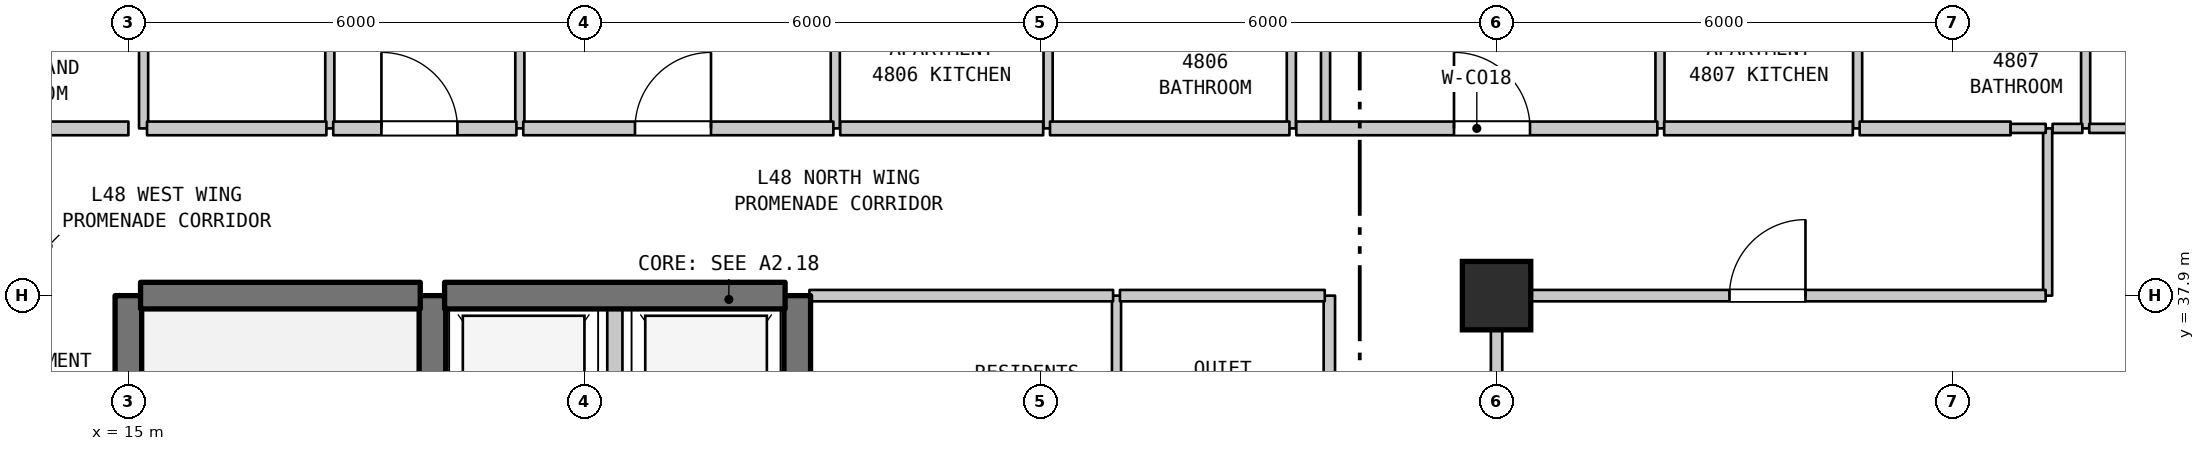
"""IFC4 building model, lengths in metres.
Left out: names, types, materials, properties, quantities, classifications, styles, units other than length and angle.
Written with IfcOpenShell. Run it as: python <this file> out.ifc"""

import sys

from ifc_helpers import new_model, si_unit, direction, frame, frame_2d, origin, origin_2d, place, context, subcontext, project, spatial, rectangle, extrude, element, fill, save


model = new_model("IFC4")
c1 = context("Model", 3, precision=1e-05, world=origin(), true_north=direction((0.0, 1.0)))
c2 = subcontext(c1, "Body", "Model", "MODEL_VIEW")
j1 = project(units=[si_unit("LENGTHUNIT", "METRE"), si_unit("PLANEANGLEUNIT", "RADIAN")], contexts=[c1])
p1 = place(None, origin())
s1 = spatial("IfcSite", under=j1, at=p1, CompositionType="ELEMENT")
p2 = place(p1, origin())
s2 = spatial("IfcBuilding", under=s1, at=p2, CompositionType="ELEMENT")
p3 = place(p2, frame((0.0, 0.0, 195.8)))
s3 = spatial("IfcBuildingStorey", under=s2, at=p3, CompositionType="ELEMENT", Elevation=195.8)
p4 = place(p3, frame((33.0, 37.9, 0.0), z_axis=(0.0, 0.0, 1.0), x_axis=(1.0, 0.0, 0.0)))
e1 = element("IfcColumn", 1, at=p4, inside=s3, PredefinedType="COLUMN", context=c2, shape_type="SweptSolid", body=[
    extrude(rectangle(XDim=0.9, YDim=0.9, at=origin_2d()), origin(), (0.0, 0.0, 1.0), 3.7),
])
p5 = place(p3, frame((15.0, 31.1, 0.0), z_axis=(0.0, 0.0, 1.0), x_axis=(0.0, 1.0, 0.0)))
e2 = element("IfcWall", 2, at=p5, inside=s3, PredefinedType="SHEAR", context=c2, shape_type="SweptSolid", body=[
    extrude(rectangle(XDim=6.8, YDim=0.35, at=frame_2d((3.4, 0.0))), origin(), (0.0, 0.0, 1.0), 3.39),
])
p6 = place(p3, frame((15.2, 40.1, 0.0), z_axis=(0.0, 0.0, 1.0), x_axis=(0.0, 1.0, 0.0)))
e3 = element("IfcWall", 3, at=p6, inside=s3, PredefinedType="PARTITIONING", context=c2, shape_type="SweptSolid", body=[
    extrude(rectangle(XDim=3.2, YDim=0.12, at=frame_2d((1.6, 0.0))), origin(), (0.0, 0.0, 1.0), 3.39),
])
p7 = place(p3, frame((17.65, 40.1, 0.0), z_axis=(0.0, 0.0, 1.0), x_axis=(0.0, 1.0, 0.0)))
e4 = element("IfcWall", 4, at=p7, inside=s3, PredefinedType="PARTITIONING", context=c2, shape_type="SweptSolid", body=[
    extrude(rectangle(XDim=3.2, YDim=0.12, at=frame_2d((1.6, 0.0))), origin(), (0.0, 0.0, 1.0), 3.39),
])
p8 = place(p7, frame((1.15, 0.0, 0.0)))
e5 = element("IfcOpeningElement", 5, at=p8, cuts=e4, PredefinedType="OPENING", context=c2, shape_type="SweptSolid", body=[
    extrude(rectangle(XDim=0.9, YDim=2.15, at=frame_2d((0.45, 1.075))), frame((0.0, 0.07, 0.0), z_axis=(0.0, -1.0, 0.0), x_axis=(1.0, 0.0, 0.0)), (0.0, 0.0, 1.0), 0.14),
])
p9 = place(p3, frame((19.0, 35.0, 0.0), z_axis=(0.0, 0.0, 1.0), x_axis=(0.0, 1.0, 0.0)))
e6 = element("IfcWall", 6, at=p9, inside=s3, PredefinedType="SHEAR", context=c2, shape_type="SweptSolid", body=[
    extrude(rectangle(XDim=2.9, YDim=0.35, at=frame_2d((1.45, 0.0))), origin(), (0.0, 0.0, 1.0), 3.39),
])
p10 = place(p3, frame((20.15, 40.1, 0.0), z_axis=(0.0, 0.0, 1.0), x_axis=(0.0, 1.0, 0.0)))
e7 = element("IfcWall", 7, at=p10, inside=s3, PredefinedType="PARTITIONING", context=c2, shape_type="SweptSolid", body=[
    extrude(rectangle(XDim=13.79, YDim=0.12, at=frame_2d((6.895, 0.0))), origin(), (0.0, 0.0, 1.0), 3.39),
])
p11 = place(p3, frame((21.4, 35.0, 0.0), z_axis=(0.0, 0.0, 1.0), x_axis=(0.0, 1.0, 0.0)))
e8 = element("IfcWall", 8, at=p11, inside=s3, PredefinedType="STANDARD", context=c2, shape_type="SweptSolid", body=[
    extrude(rectangle(XDim=2.9, YDim=0.2, at=frame_2d((1.45, 0.0))), origin(), (0.0, 0.0, 1.0), 3.39),
])
p12 = place(p3, frame((23.8, 35.0, 0.0), z_axis=(0.0, 0.0, 1.0), x_axis=(0.0, 1.0, 0.0)))
e9 = element("IfcWall", 9, at=p12, inside=s3, PredefinedType="SHEAR", context=c2, shape_type="SweptSolid", body=[
    extrude(rectangle(XDim=2.9, YDim=0.35, at=frame_2d((1.45, 0.0))), origin(), (0.0, 0.0, 1.0), 3.39),
])
for number, where, z_axis, x_axis in (
    (10, (24.3, 40.1, 0.0), (0.0, 0.0, 1.0), (0.0, 1.0, 0.0)),
    (11, (27.1, 40.1, 0.0), (0.0, 0.0, 1.0), (0.0, 1.0, 0.0)),
):
    element("IfcWall", number, at=place(p3, frame(where, z_axis=z_axis, x_axis=x_axis)), inside=s3, PredefinedType="PARTITIONING", context=c2, shape_type="SweptSolid", body=[
        extrude(rectangle(XDim=2.3, YDim=0.12, at=frame_2d((1.15, 0.0))), origin(), (0.0, 0.0, 1.0), 3.39),
    ])
p13 = place(p3, frame((28.0, 35.0, 0.0), z_axis=(0.0, 0.0, 1.0), x_axis=(0.0, 1.0, 0.0)))
e12 = element("IfcWall", 12, at=p13, inside=s3, PredefinedType="PARTITIONING", context=c2, shape_type="SweptSolid", body=[
    extrude(rectangle(XDim=2.9, YDim=0.12, at=frame_2d((1.45, 0.0))), origin(), (0.0, 0.0, 1.0), 3.39),
])
p14 = place(p3, frame((30.3, 40.1, 0.0), z_axis=(0.0, 0.0, 1.0), x_axis=(0.0, 1.0, 0.0)))
e13 = element("IfcWall", 13, at=p14, inside=s3, PredefinedType="PARTITIONING", context=c2, shape_type="SweptSolid", body=[
    extrude(rectangle(XDim=2.3, YDim=0.12, at=frame_2d((1.15, 0.0))), origin(), (0.0, 0.0, 1.0), 3.39),
])
p15 = place(p3, frame((30.75, 40.1, 0.0), z_axis=(0.0, 0.0, 1.0), x_axis=(0.0, 1.0, 0.0)))
e14 = element("IfcWall", 14, at=p15, inside=s3, PredefinedType="PARTITIONING", context=c2, shape_type="SweptSolid", body=[
    extrude(rectangle(XDim=13.79, YDim=0.12, at=frame_2d((6.895, 0.0))), origin(), (0.0, 0.0, 1.0), 3.39),
])
p16 = place(p3, frame((30.8, 35.0, 0.0), z_axis=(0.0, 0.0, 1.0), x_axis=(0.0, 1.0, 0.0)))
e15 = element("IfcWall", 15, at=p16, inside=s3, PredefinedType="STANDARD", context=c2, shape_type="SweptSolid", body=[
    extrude(rectangle(XDim=2.9, YDim=0.15, at=frame_2d((1.45, 0.0))), origin(), (0.0, 0.0, 1.0), 3.39),
])
p17 = place(p3, frame((33.0, 34.22, 0.0), z_axis=(0.0, 0.0, 1.0), x_axis=(0.0, 1.0, 0.0)))
e16 = element("IfcWall", 16, at=p17, inside=s3, PredefinedType="STANDARD", context=c2, shape_type="SweptSolid", body=[
    extrude(rectangle(XDim=3.68, YDim=0.15, at=frame_2d((1.84, 0.0))), origin(), (0.0, 0.0, 1.0), 2.89),
])
p18 = place(p17, frame((1.268, 0.0, 0.0)))
e17 = element("IfcOpeningElement", 17, at=p18, cuts=e16, PredefinedType="OPENING", context=c2, shape_type="SweptSolid", body=[
    extrude(rectangle(XDim=1.0, YDim=2.15, at=frame_2d((0.5, 1.075))), frame((0.0, 0.085, 0.0), z_axis=(0.0, -1.0, 0.0), x_axis=(1.0, 0.0, 0.0)), (0.0, 0.0, 1.0), 0.17),
])
for number, where, z_axis, x_axis in (
    (18, (35.15, 40.1, 0.0), (0.0, 0.0, 1.0), (0.0, 1.0, 0.0)),
    (19, (37.75, 40.1, 0.0), (0.0, 0.0, 1.0), (0.0, 1.0, 0.0)),
):
    element("IfcWall", number, at=place(p3, frame(where, z_axis=z_axis, x_axis=x_axis)), inside=s3, PredefinedType="PARTITIONING", context=c2, shape_type="SweptSolid", body=[
        extrude(rectangle(XDim=2.3, YDim=0.12, at=frame_2d((1.15, 0.0))), origin(), (0.0, 0.0, 1.0), 3.39),
    ])
p19 = place(p3, frame((40.25, 37.9, 0.0), z_axis=(0.0, 0.0, 1.0), x_axis=(0.0, 1.0, 0.0)))
e20 = element("IfcWall", 20, at=p19, inside=s3, PredefinedType="PARTITIONING", context=c2, shape_type="SweptSolid", body=[
    extrude(rectangle(XDim=2.2, YDim=0.12, at=frame_2d((1.1, 0.0))), origin(), (0.0, 0.0, 1.0), 3.39),
])
p20 = place(p3, frame((40.75, 40.1, 0.0), z_axis=(0.0, 0.0, 1.0), x_axis=(0.0, 1.0, 0.0)))
e21 = element("IfcWall", 21, at=p20, inside=s3, PredefinedType="PARTITIONING", context=c2, shape_type="SweptSolid", body=[
    extrude(rectangle(XDim=2.3, YDim=0.12, at=frame_2d((1.15, 0.0))), origin(), (0.0, 0.0, 1.0), 3.39),
])
p21 = place(p3, frame((15.16, 37.9, 0.0), z_axis=(0.0, 0.0, 1.0), x_axis=(1.0, 0.0, 0.0)))
e22 = element("IfcWall", 22, at=p21, inside=s3, PredefinedType="SHEAR", context=c2, shape_type="SweptSolid", body=[
    extrude(rectangle(XDim=3.68, YDim=0.35, at=frame_2d((1.84, 0.0))), origin(), (0.0, 0.0, 1.0), 3.39),
])
p22 = place(p3, frame((19.16, 37.9, 0.0), z_axis=(0.0, 0.0, 1.0), x_axis=(1.0, 0.0, 0.0)))
e23 = element("IfcWall", 23, at=p22, inside=s3, PredefinedType="SHEAR", context=c2, shape_type="SweptSolid", body=[
    extrude(rectangle(XDim=4.48, YDim=0.35, at=frame_2d((2.24, 0.0))), origin(), (0.0, 0.0, 1.0), 3.39),
])
p23 = place(p3, frame((23.96, 37.9, 0.0), z_axis=(0.0, 0.0, 1.0), x_axis=(1.0, 0.0, 0.0)))
e24 = element("IfcWall", 24, at=p23, inside=s3, PredefinedType="STANDARD", context=c2, shape_type="SweptSolid", body=[
    extrude(rectangle(XDim=3.995, YDim=0.15, at=frame_2d((1.998, 0.0))), origin(), (0.0, 0.0, 1.0), 2.89),
])
p24 = place(p3, frame((28.045, 37.9, 0.0), z_axis=(0.0, 0.0, 1.0), x_axis=(1.0, 0.0, 0.0)))
e25 = element("IfcWall", 25, at=p24, inside=s3, PredefinedType="STANDARD", context=c2, shape_type="SweptSolid", body=[
    extrude(rectangle(XDim=2.695, YDim=0.15, at=frame_2d((1.348, 0.0))), origin(), (0.0, 0.0, 1.0), 2.89),
])
p25 = place(p3, frame((33.06, 37.9, 0.0), z_axis=(0.0, 0.0, 1.0), x_axis=(1.0, 0.0, 0.0)))
e26 = element("IfcWall", 26, at=p25, inside=s3, PredefinedType="STANDARD", context=c2, shape_type="SweptSolid", body=[
    extrude(rectangle(XDim=7.164, YDim=0.15, at=frame_2d((3.582, 0.0))), origin(), (0.0, 0.0, 1.0), 3.39),
])
p26 = place(p25, frame((3.004, 0.0, 0.0)))
e27 = element("IfcOpeningElement", 27, at=p26, cuts=e26, PredefinedType="OPENING", context=c2, shape_type="SweptSolid", body=[
    extrude(rectangle(XDim=1.0, YDim=2.15, at=frame_2d((0.5, 1.075))), frame((0.0, 0.085, 0.0), z_axis=(0.0, -1.0, 0.0), x_axis=(1.0, 0.0, 0.0)), (0.0, 0.0, 1.0), 0.17),
])
p27 = place(p3, frame((12.875, 40.1, 0.0), z_axis=(0.0, 0.0, 1.0), x_axis=(1.0, 0.0, 0.0)))
e28 = element("IfcWall", 28, at=p27, inside=s3, PredefinedType="STANDARD", context=c2, shape_type="SweptSolid", body=[
    extrude(rectangle(XDim=2.125, YDim=0.18, at=frame_2d((1.062, 0.0))), origin(), (0.0, 0.0, 1.0), 3.39),
])
p28 = place(p3, frame((15.245, 40.1, 0.0), z_axis=(0.0, 0.0, 1.0), x_axis=(1.0, 0.0, 0.0)))
e29 = element("IfcWall", 29, at=p28, inside=s3, PredefinedType="STANDARD", context=c2, shape_type="SweptSolid", body=[
    extrude(rectangle(XDim=2.36, YDim=0.18, at=frame_2d((1.18, 0.0))), origin(), (0.0, 0.0, 1.0), 3.39),
])
p29 = place(p3, frame((17.695, 40.1, 0.0), z_axis=(0.0, 0.0, 1.0), x_axis=(1.0, 0.0, 0.0)))
e30 = element("IfcWall", 30, at=p29, inside=s3, PredefinedType="STANDARD", context=c2, shape_type="SweptSolid", body=[
    extrude(rectangle(XDim=2.41, YDim=0.18, at=frame_2d((1.205, 0.0))), origin(), (0.0, 0.0, 1.0), 3.39),
])
p30 = place(p29, frame((0.634, 0.0, 0.0)))
e31 = element("IfcOpeningElement", 31, at=p30, cuts=e30, PredefinedType="OPENING", context=c2, shape_type="SweptSolid", body=[
    extrude(rectangle(XDim=1.0, YDim=2.15, at=frame_2d((0.5, 1.075))), frame((0.0, 0.1, 0.0), z_axis=(0.0, -1.0, 0.0), x_axis=(1.0, 0.0, 0.0)), (0.0, 0.0, 1.0), 0.2),
])
p31 = place(p3, frame((20.195, 40.1, 0.0), z_axis=(0.0, 0.0, 1.0), x_axis=(1.0, 0.0, 0.0)))
e32 = element("IfcWall", 32, at=p31, inside=s3, PredefinedType="STANDARD", context=c2, shape_type="SweptSolid", body=[
    extrude(rectangle(XDim=4.08, YDim=0.18, at=frame_2d((2.04, 0.0))), origin(), (0.0, 0.0, 1.0), 3.39),
])
p32 = place(p31, frame((1.47, 0.0, 0.0)))
e33 = element("IfcOpeningElement", 33, at=p32, cuts=e32, PredefinedType="OPENING", context=c2, shape_type="SweptSolid", body=[
    extrude(rectangle(XDim=1.0, YDim=2.15, at=frame_2d((0.5, 1.075))), frame((0.0, 0.1, 0.0), z_axis=(0.0, -1.0, 0.0), x_axis=(1.0, 0.0, 0.0)), (0.0, 0.0, 1.0), 0.2),
])
p33 = place(p3, frame((24.365, 40.1, 0.0), z_axis=(0.0, 0.0, 1.0), x_axis=(1.0, 0.0, 0.0)))
e34 = element("IfcWall", 34, at=p33, inside=s3, PredefinedType="STANDARD", context=c2, shape_type="SweptSolid", body=[
    extrude(rectangle(XDim=2.67, YDim=0.18, at=frame_2d((1.335, 0.0))), origin(), (0.0, 0.0, 1.0), 3.39),
])
p34 = place(p3, frame((27.125, 40.1, 0.0), z_axis=(0.0, 0.0, 1.0), x_axis=(1.0, 0.0, 0.0)))
e35 = element("IfcWall", 35, at=p34, inside=s3, PredefinedType="STANDARD", context=c2, shape_type="SweptSolid", body=[
    extrude(rectangle(XDim=3.15, YDim=0.18, at=frame_2d((1.575, 0.0))), origin(), (0.0, 0.0, 1.0), 3.39),
])
p35 = place(p3, frame((30.365, 40.1, 0.0), z_axis=(0.0, 0.0, 1.0), x_axis=(1.0, 0.0, 0.0)))
e36 = element("IfcWall", 36, at=p35, inside=s3, PredefinedType="STANDARD", context=c2, shape_type="SweptSolid", body=[
    extrude(rectangle(XDim=4.75, YDim=0.18, at=frame_2d((2.375, 0.0))), origin(), (0.0, 0.0, 1.0), 3.39),
])
p36 = place(p35, frame((2.075, 0.0, 0.0)))
e37 = element("IfcOpeningElement", 37, at=p36, cuts=e36, PredefinedType="OPENING", context=c2, shape_type="SweptSolid", body=[
    extrude(rectangle(XDim=1.0, YDim=2.15, at=frame_2d((0.5, 1.075))), frame((0.0, 0.1, 0.0), z_axis=(0.0, -1.0, 0.0), x_axis=(1.0, 0.0, 0.0)), (0.0, 0.0, 1.0), 0.2),
])
p37 = place(p3, frame((35.205, 40.1, 0.0), z_axis=(0.0, 0.0, 1.0), x_axis=(1.0, 0.0, 0.0)))
e38 = element("IfcWall", 38, at=p37, inside=s3, PredefinedType="STANDARD", context=c2, shape_type="SweptSolid", body=[
    extrude(rectangle(XDim=2.482, YDim=0.18, at=frame_2d((1.241, 0.0))), origin(), (0.0, 0.0, 1.0), 3.39),
])
p38 = place(p3, frame((37.777, 40.1, 0.0), z_axis=(0.0, 0.0, 1.0), x_axis=(1.0, 0.0, 0.0)))
e39 = element("IfcWall", 39, at=p38, inside=s3, PredefinedType="STANDARD", context=c2, shape_type="SweptSolid", body=[
    extrude(rectangle(XDim=1.986, YDim=0.18, at=frame_2d((0.993, 0.0))), origin(), (0.0, 0.0, 1.0), 3.39),
])
p39 = place(p3, frame((39.763, 40.1, 0.0), z_axis=(0.0, 0.0, 1.0), x_axis=(1.0, 0.0, 0.0)))
e40 = element("IfcWall", 40, at=p39, inside=s3, PredefinedType="PARTITIONING", context=c2, shape_type="SweptSolid", body=[
    extrude(rectangle(XDim=0.462, YDim=0.12, at=frame_2d((0.231, 0.0))), origin(), (0.0, 0.0, 1.0), 3.39),
])
p40 = place(p3, frame((40.315, 40.1, 0.0), z_axis=(0.0, 0.0, 1.0), x_axis=(1.0, 0.0, 0.0)))
e41 = element("IfcWall", 41, at=p40, inside=s3, PredefinedType="PARTITIONING", context=c2, shape_type="SweptSolid", body=[
    extrude(rectangle(XDim=0.392, YDim=0.12, at=frame_2d((0.196, 0.0))), origin(), (0.0, 0.0, 1.0), 3.39),
])
p41 = place(p3, frame((40.797, 40.1, 0.0), z_axis=(0.0, 0.0, 1.0), x_axis=(1.0, 0.0, 0.0)))
e42 = element("IfcWall", 42, at=p41, inside=s3, PredefinedType="PARTITIONING", context=c2, shape_type="SweptSolid", body=[
    extrude(rectangle(XDim=1.378, YDim=0.12, at=frame_2d((0.689, 0.0))), origin(), (0.0, 0.0, 1.0), 3.39),
])
p42 = place(p26, origin())
e43 = element("IfcDoor", 43, at=p42, inside=s3, OperationType="SINGLE_SWING_RIGHT", PredefinedType="DOOR", context=c2, shape_type="SweptSolid", body=[
    extrude(rectangle(XDim=1.0, YDim=2.15, at=frame_2d((0.5, 1.075))), frame((0.0, 0.025, 0.0), z_axis=(0.0, -1.0, 0.0), x_axis=(1.0, 0.0, 0.0)), (0.0, 0.0, 1.0), 0.05),
])
fill(e27, e43)
p43 = place(p30, origin())
e44 = element("IfcDoor", 44, at=p43, inside=s3, OperationType="SINGLE_SWING_LEFT", PredefinedType="DOOR", context=c2, shape_type="SweptSolid", body=[
    extrude(rectangle(XDim=1.0, YDim=2.15, at=frame_2d((0.5, 1.075))), frame((0.0, 0.025, 0.0), z_axis=(0.0, -1.0, 0.0), x_axis=(1.0, 0.0, 0.0)), (0.0, 0.0, 1.0), 0.05),
])
fill(e31, e44)
p44 = place(p32, origin())
e45 = element("IfcDoor", 45, at=p44, inside=s3, OperationType="SINGLE_SWING_RIGHT", PredefinedType="DOOR", context=c2, shape_type="SweptSolid", body=[
    extrude(rectangle(XDim=1.0, YDim=2.15, at=frame_2d((0.5, 1.075))), frame((0.0, 0.025, 0.0), z_axis=(0.0, -1.0, 0.0), x_axis=(1.0, 0.0, 0.0)), (0.0, 0.0, 1.0), 0.05),
])
fill(e33, e45)
p45 = place(p36, origin())
e46 = element("IfcDoor", 46, at=p45, inside=s3, OperationType="SINGLE_SWING_LEFT", PredefinedType="DOOR", context=c2, shape_type="SweptSolid", body=[
    extrude(rectangle(XDim=1.0, YDim=2.15, at=frame_2d((0.5, 1.075))), frame((0.0, 0.025, 0.0), z_axis=(0.0, -1.0, 0.0), x_axis=(1.0, 0.0, 0.0)), (0.0, 0.0, 1.0), 0.05),
])
fill(e37, e46)
save(model, sys.argv[1])
